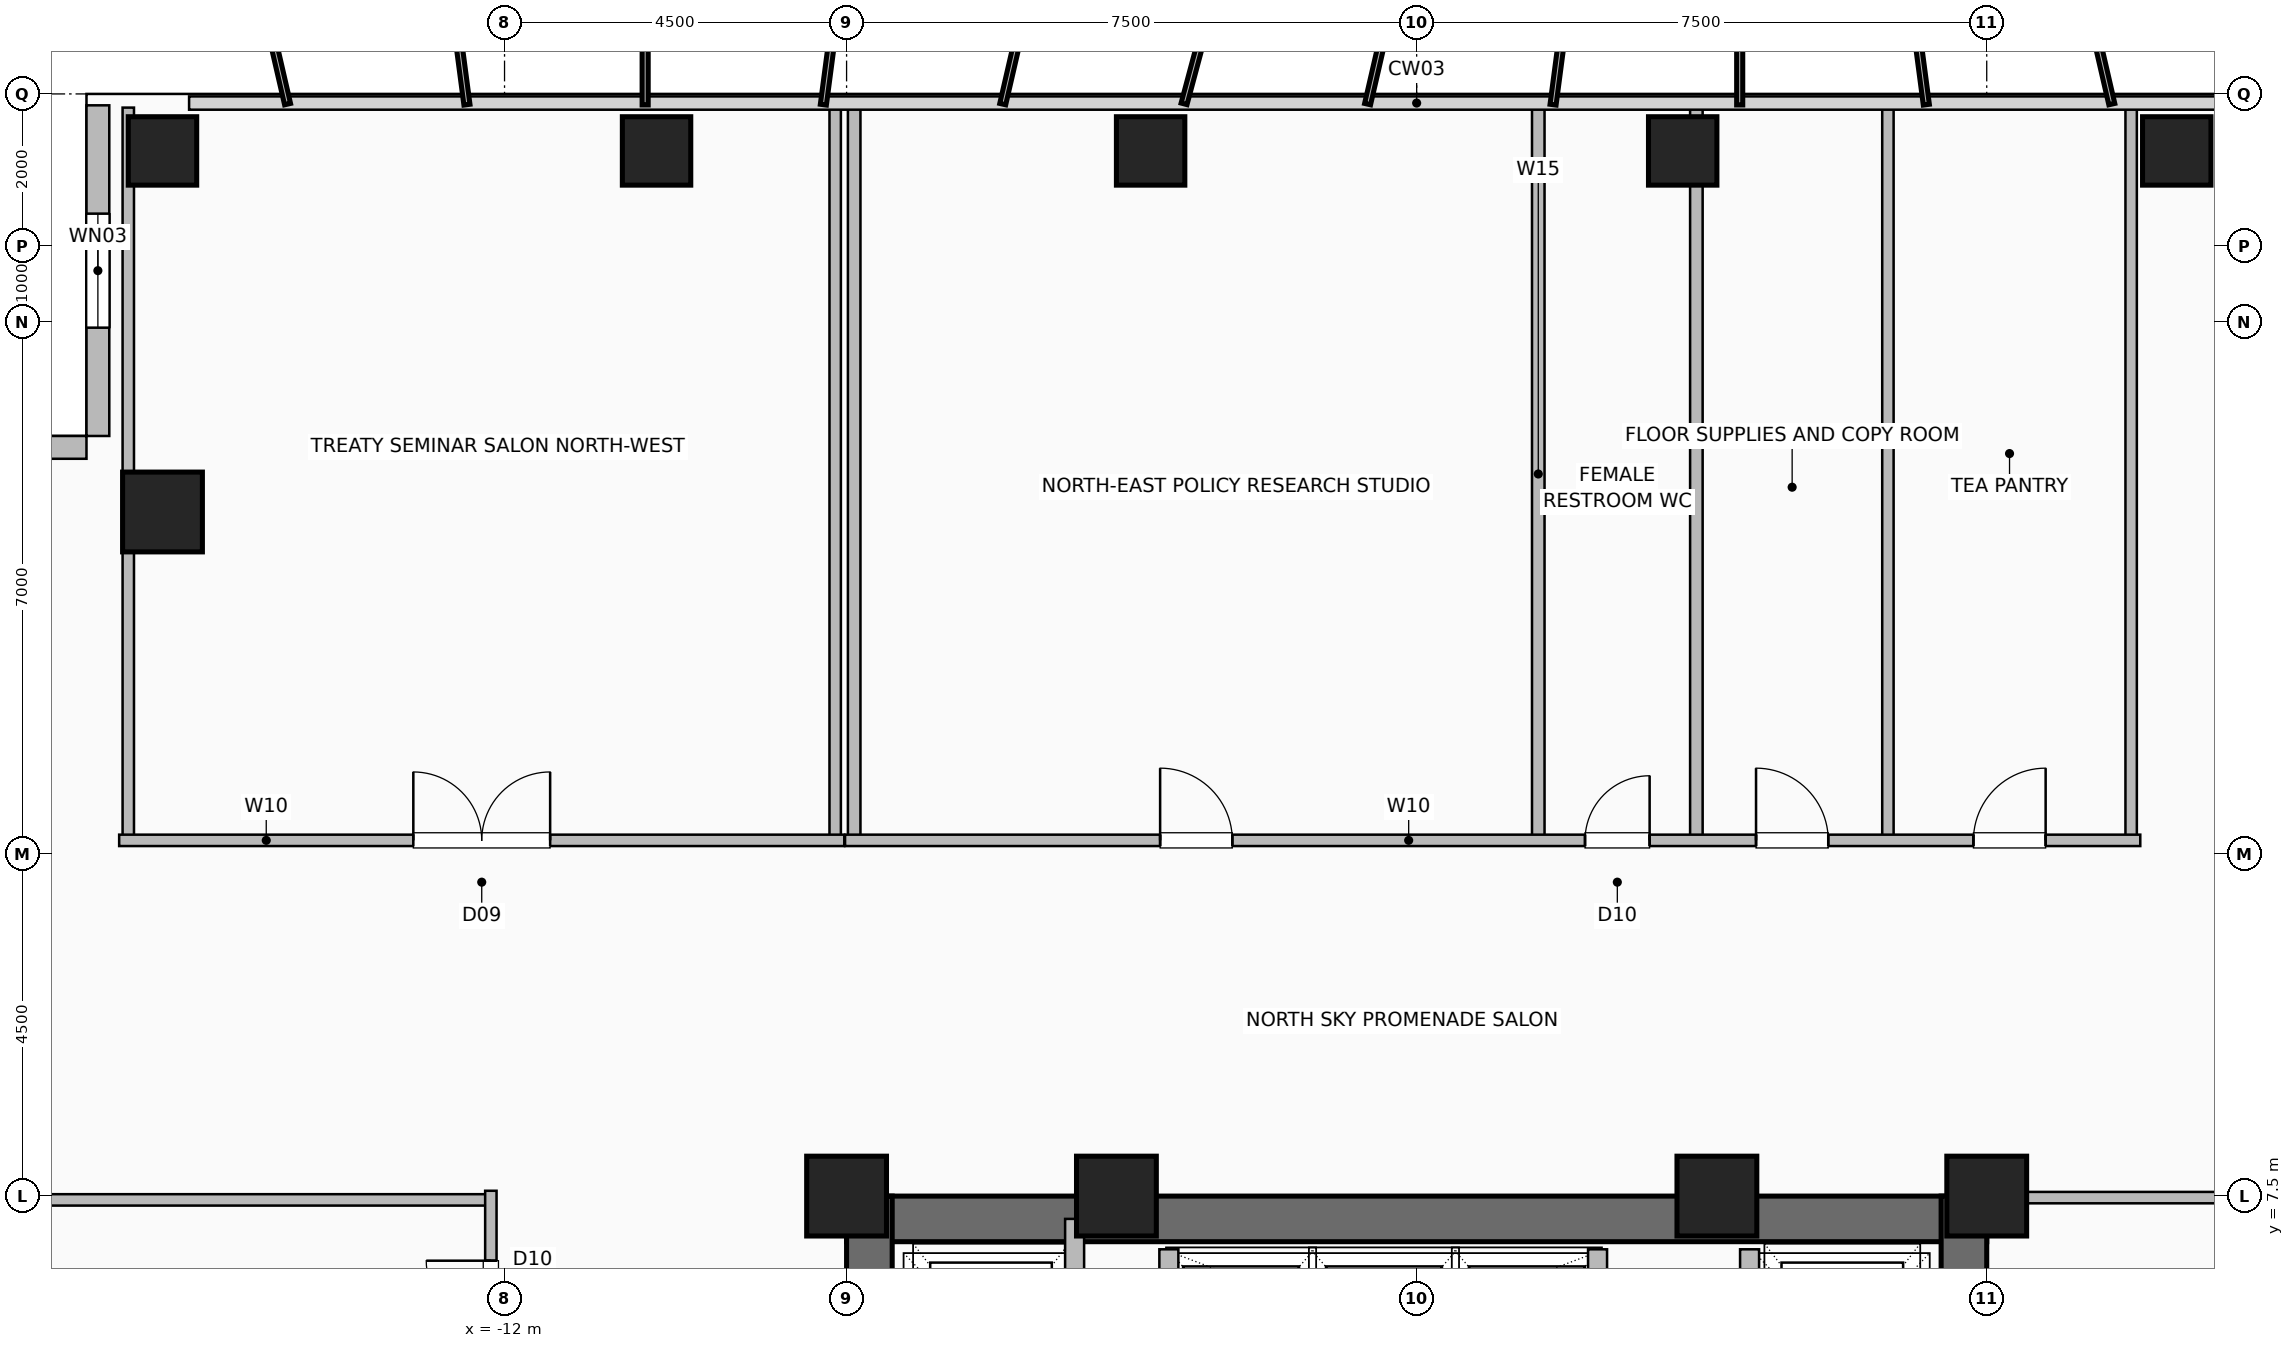
"""IFC4 building model, lengths in metres.
Left out: names, types, materials, properties, quantities, classifications, styles, units other than length and angle.
Written with IfcOpenShell. Run it as: python <this file> out.ifc"""

import sys

from ifc_helpers import new_model, si_unit, direction, frame, frame_2d, origin, origin_2d, place, context, subcontext, project, spatial, rectangle, hollow_rectangle, extrude, element, fill, save


model = new_model("IFC4")
c1 = context("Model", 3, precision=1e-05, world=origin(), true_north=direction((0.0, 1.0)))
c2 = subcontext(c1, "Body", "Model", "MODEL_VIEW")
j1 = project(units=[si_unit("LENGTHUNIT", "METRE"), si_unit("PLANEANGLEUNIT", "RADIAN")], contexts=[c1])
p1 = place(None, origin())
s1 = spatial("IfcSite", under=j1, at=p1, CompositionType="ELEMENT")
p2 = place(p1, origin())
s2 = spatial("IfcBuilding", under=s1, at=p2, CompositionType="ELEMENT")
p3 = place(p2, frame((0.0, 0.0, 104.8)))
s3 = spatial("IfcBuildingStorey", under=s2, at=p3, CompositionType="ELEMENT", Elevation=104.8)
for number, where, z_axis, x_axis in (
    (1, (7.5, 7.5, 0.0), (0.0, 0.0, 1.0), (1.0, 0.0, 0.0)),
    (2, (3.95, 7.5, 0.0), (0.0, 0.0, 1.0), (1.0, 0.0, 0.0)),
    (3, (-3.95, 7.5, 0.0), (0.0, 0.0, 1.0), (1.0, 0.0, 0.0)),
    (4, (-7.5, 7.5, 0.0), (0.0, 0.0, 1.0), (1.0, 0.0, 0.0)),
):
    element("IfcColumn", number, at=place(p3, frame(where, z_axis=z_axis, x_axis=x_axis)), inside=s3, PredefinedType="COLUMN", context=c2, shape_type="SweptSolid", body=[
        extrude(hollow_rectangle(XDim=1.05, YDim=1.05, WallThickness=0.05, at=origin_2d()), origin(), (0.0, 0.0, 1.0), 3.6),
    ])
for number, where, z_axis, x_axis in (
    (5, (-16.5, 21.25, 0.0), (0.0, 0.0, 1.0), (1.0, 0.0, 0.0)),
    (6, (-10.0, 21.25, 0.0), (0.0, 0.0, 1.0), (1.0, 0.0, 0.0)),
    (7, (-3.5, 21.25, 0.0), (0.0, 0.0, 1.0), (1.0, 0.0, 0.0)),
    (8, (3.5, 21.25, 0.0), (0.0, 0.0, 1.0), (1.0, 0.0, 0.0)),
    (9, (10.0, 21.25, 0.0), (0.0, 0.0, 1.0), (1.0, 0.0, 0.0)),
):
    element("IfcColumn", number, at=place(p3, frame(where, z_axis=z_axis, x_axis=x_axis)), inside=s3, PredefinedType="COLUMN", context=c2, shape_type="SweptSolid", body=[
        extrude(hollow_rectangle(XDim=0.9, YDim=0.9, WallThickness=0.045, at=origin_2d()), origin(), (0.0, 0.0, 1.0), 3.6),
    ])
p4 = place(p3, frame((-16.5, 16.5, 0.0), z_axis=(0.0, 0.0, 1.0), x_axis=(1.0, 0.0, 0.0)))
e10 = element("IfcColumn", 10, at=p4, inside=s3, PredefinedType="COLUMN", context=c2, shape_type="SweptSolid", body=[
    extrude(hollow_rectangle(XDim=1.05, YDim=1.05, WallThickness=0.05, at=origin_2d()), origin(), (0.0, 0.0, 1.0), 3.6),
])
p5 = place(p3, frame((-17.35, 21.85, 0.0), z_axis=(0.0, 0.0, 1.0), x_axis=(0.0, -1.0, 0.0)))
e11 = element("IfcWall", 11, at=p5, inside=s3, PredefinedType="SOLIDWALL", context=c2, shape_type="SweptSolid", body=[
    extrude(rectangle(XDim=4.35, YDim=0.3, at=frame_2d((2.175, 0.0))), origin(), (0.0, 0.0, 1.0), 3.36),
])
p6 = place(p5, frame((1.425, 0.0, 0.9)))
e12 = element("IfcOpeningElement", 12, at=p6, cuts=e11, PredefinedType="OPENING", context=c2, shape_type="SweptSolid", body=[
    extrude(rectangle(XDim=1.5, YDim=1.8, at=frame_2d((0.75, 0.9))), frame((0.0, 0.16, 0.0), z_axis=(0.0, -1.0, 0.0), x_axis=(1.0, 0.0, 0.0)), (0.0, 0.0, 1.0), 0.32),
])
p7 = place(p3, frame((-21.85, 17.35, 0.0), z_axis=(0.0, 0.0, 1.0), x_axis=(1.0, 0.0, 0.0)))
e13 = element("IfcWall", 13, at=p7, inside=s3, PredefinedType="SOLIDWALL", context=c2, shape_type="SweptSolid", body=[
    extrude(rectangle(XDim=4.35, YDim=0.3, at=frame_2d((2.175, 0.0))), origin(), (0.0, 0.0, 1.0), 3.36),
])
p8 = place(p3, frame((-7.5, 7.2, 0.0), z_axis=(0.0, 0.0, 1.0), x_axis=(1.0, 0.0, 0.0)))
e14 = element("IfcWall", 14, at=p8, inside=s3, PredefinedType="SHEAR", context=c2, shape_type="SweptSolid", body=[
    extrude(rectangle(XDim=15.0, YDim=0.6, at=frame_2d((7.5, 0.0))), origin(), (0.0, 0.0, 1.0), 3.36),
])
p9 = place(p3, frame((-7.2, -7.5, 0.0), z_axis=(0.0, 0.0, 1.0), x_axis=(0.0, 1.0, 0.0)))
e15 = element("IfcWall", 15, at=p9, inside=s3, PredefinedType="SHEAR", context=c2, shape_type="SweptSolid", body=[
    extrude(rectangle(XDim=15.0, YDim=0.6, at=frame_2d((7.5, 0.0))), origin(), (0.0, 0.0, 1.0), 3.36),
])
p10 = place(p9, frame((9.5, 0.0, 0.0)))
e16 = element("IfcOpeningElement", 16, at=p10, cuts=e15, PredefinedType="OPENING", context=c2, shape_type="SweptSolid", body=[
    extrude(rectangle(XDim=1.0, YDim=2.08, at=frame_2d((0.5, 1.04))), frame((0.0, 0.31, 0.0), z_axis=(0.0, -1.0, 0.0), x_axis=(1.0, 0.0, 0.0)), (0.0, 0.0, 1.0), 0.62),
])
p11 = place(p3, frame((7.2, -7.5, 0.0), z_axis=(0.0, 0.0, 1.0), x_axis=(0.0, 1.0, 0.0)))
e17 = element("IfcWall", 17, at=p11, inside=s3, PredefinedType="SHEAR", context=c2, shape_type="SweptSolid", body=[
    extrude(rectangle(XDim=15.0, YDim=0.6, at=frame_2d((7.5, 0.0))), origin(), (0.0, 0.0, 1.0), 3.36),
])
for number, where, z_axis, x_axis in (
    (18, (-3.26, 4.58, 0.0), (0.0, 0.0, 1.0), (0.0, 1.0, 0.0)),
    (19, (2.38, 4.58, 0.0), (0.0, 0.0, 1.0), (0.0, 1.0, 0.0)),
):
    element("IfcWall", number, at=place(p3, frame(where, z_axis=z_axis, x_axis=x_axis)), inside=s3, PredefinedType="SHEAR", context=c2, shape_type="SweptSolid", body=[
        extrude(rectangle(XDim=2.22, YDim=0.25, at=frame_2d((1.11, 0.0))), origin(), (0.0, 0.0, 1.0), 3.36),
    ])
p12 = place(p3, frame((-4.5, 4.35, 0.0), z_axis=(0.0, 0.0, 1.0), x_axis=(0.0, 1.0, 0.0)))
e20 = element("IfcWall", 20, at=p12, inside=s3, PredefinedType="SHEAR", context=c2, shape_type="SweptSolid", body=[
    extrude(rectangle(XDim=2.85, YDim=0.25, at=frame_2d((1.425, 0.0))), origin(), (0.0, 0.0, 1.0), 3.36),
])
p13 = place(p3, frame((4.38, 4.3, 0.0), z_axis=(0.0, 0.0, 1.0), x_axis=(0.0, 1.0, 0.0)))
e21 = element("IfcWall", 21, at=p13, inside=s3, PredefinedType="SHEAR", context=c2, shape_type="SweptSolid", body=[
    extrude(rectangle(XDim=2.5, YDim=0.25, at=frame_2d((1.25, 0.0))), origin(), (0.0, 0.0, 1.0), 3.36),
])
p14 = place(p13, frame((0.8, 0.0, 0.0)))
e22 = element("IfcOpeningElement", 22, at=p14, cuts=e21, PredefinedType="OPENING", context=c2, shape_type="SweptSolid", body=[
    extrude(rectangle(XDim=1.2, YDim=2.2, at=frame_2d((0.6, 1.1))), frame((0.0, 0.135, 0.0), z_axis=(0.0, -1.0, 0.0), x_axis=(1.0, 0.0, 0.0)), (0.0, 0.0, 1.0), 0.27),
])
p15 = place(p3, frame((-21.82, 7.45, 0.0), z_axis=(0.0, 0.0, 1.0), x_axis=(1.0, 0.0, 0.0)))
e23 = element("IfcWall", 23, at=p15, inside=s3, PredefinedType="PARTITIONING", context=c2, shape_type="SweptSolid", body=[
    extrude(rectangle(XDim=9.64, YDim=0.15, at=frame_2d((4.82, 0.0))), origin(), (0.0, 0.0, 1.0), 3.36),
])
p16 = place(p3, frame((-12.18, -7.57, 0.0), z_axis=(0.0, 0.0, 1.0), x_axis=(0.0, 1.0, 0.0)))
e24 = element("IfcWall", 24, at=p16, inside=s3, PredefinedType="PARTITIONING", context=c2, shape_type="SweptSolid", body=[
    extrude(rectangle(XDim=15.14, YDim=0.15, at=frame_2d((7.57, 0.0))), origin(), (0.0, 0.0, 1.0), 3.36),
])
p17 = place(p16, frame((2.62, 0.0, 0.0)))
e25 = element("IfcOpeningElement", 25, at=p17, cuts=e24, PredefinedType="OPENING", context=c2, shape_type="SweptSolid", body=[
    extrude(rectangle(XDim=0.95, YDim=2.06, at=frame_2d((0.475, 1.03))), frame((0.0, 0.085, 0.0), z_axis=(0.0, -1.0, 0.0), x_axis=(1.0, 0.0, 0.0)), (0.0, 0.0, 1.0), 0.17),
])
p18 = place(p16, frame((8.845, 0.0, 0.0)))
e26 = element("IfcOpeningElement", 26, at=p18, cuts=e24, PredefinedType="OPENING", context=c2, shape_type="SweptSolid", body=[
    extrude(rectangle(XDim=0.95, YDim=2.06, at=frame_2d((0.475, 1.03))), frame((0.0, 0.085, 0.0), z_axis=(0.0, -1.0, 0.0), x_axis=(1.0, 0.0, 0.0)), (0.0, 0.0, 1.0), 0.17),
])
p19 = place(p16, frame((13.37, 0.0, 0.0)))
e27 = element("IfcOpeningElement", 27, at=p19, cuts=e24, PredefinedType="OPENING", context=c2, shape_type="SweptSolid", body=[
    extrude(rectangle(XDim=0.85, YDim=2.05, at=frame_2d((0.425, 1.025))), frame((0.0, 0.085, 0.0), z_axis=(0.0, -1.0, 0.0), x_axis=(1.0, 0.0, 0.0)), (0.0, 0.0, 1.0), 0.17),
])
for number, where, z_axis, x_axis in (
    (28, (-16.95, 12.18, 0.0), (0.0, 0.0, 1.0), (0.0, 1.0, 0.0)),
    (29, (-7.65, 12.18, 0.0), (0.0, 0.0, 1.0), (0.0, 1.0, 0.0)),
):
    element("IfcWall", number, at=place(p3, frame(where, z_axis=z_axis, x_axis=x_axis)), inside=s3, PredefinedType="PARTITIONING", context=c2, shape_type="SweptSolid", body=[
        extrude(rectangle(XDim=9.64, YDim=0.15, at=frame_2d((4.82, 0.0))), origin(), (0.0, 0.0, 1.0), 3.36),
    ])
p20 = place(p3, frame((-17.07, 12.18, 0.0), z_axis=(0.0, 0.0, 1.0), x_axis=(1.0, 0.0, 0.0)))
e30 = element("IfcWall", 30, at=p20, inside=s3, PredefinedType="PARTITIONING", context=c2, shape_type="SweptSolid", body=[
    extrude(rectangle(XDim=9.54, YDim=0.15, at=frame_2d((4.77, 0.0))), origin(), (0.0, 0.0, 1.0), 3.36),
])
p21 = place(p20, frame((3.87, 0.0, 0.0)))
e31 = element("IfcOpeningElement", 31, at=p21, cuts=e30, PredefinedType="OPENING", context=c2, shape_type="SweptSolid", body=[
    extrude(rectangle(XDim=1.8, YDim=2.08, at=frame_2d((0.9, 1.04))), frame((0.0, 0.085, 0.0), z_axis=(0.0, -1.0, 0.0), x_axis=(1.0, 0.0, 0.0)), (0.0, 0.0, 1.0), 0.17),
])
for number, where, z_axis, x_axis in (
    (32, (3.68, 12.18, 0.0), (0.0, 0.0, 1.0), (0.0, 1.0, 0.0)),
    (33, (-7.4, 12.18, 0.0), (0.0, 0.0, 1.0), (0.0, 1.0, 0.0)),
    (34, (1.6, 12.18, 0.0), (0.0, 0.0, 1.0), (0.0, 1.0, 0.0)),
):
    element("IfcWall", number, at=place(p3, frame(where, z_axis=z_axis, x_axis=x_axis)), inside=s3, PredefinedType="PLUMBINGWALL", context=c2, shape_type="SweptSolid", body=[
        extrude(rectangle(XDim=9.64, YDim=0.165, at=frame_2d((4.82, 0.0))), origin(), (0.0, 0.0, 1.0), 3.36),
    ])
for number, where, z_axis, x_axis in (
    (35, (6.2, 12.18, 0.0), (0.0, 0.0, 1.0), (0.0, 1.0, 0.0)),
    (36, (9.4, 12.18, 0.0), (0.0, 0.0, 1.0), (0.0, 1.0, 0.0)),
):
    element("IfcWall", number, at=place(p3, frame(where, z_axis=z_axis, x_axis=x_axis)), inside=s3, PredefinedType="PARTITIONING", context=c2, shape_type="SweptSolid", body=[
        extrude(rectangle(XDim=9.64, YDim=0.15, at=frame_2d((4.82, 0.0))), origin(), (0.0, 0.0, 1.0), 3.36),
    ])
p22 = place(p3, frame((-7.52, 12.18, 0.0), z_axis=(0.0, 0.0, 1.0), x_axis=(1.0, 0.0, 0.0)))
e37 = element("IfcWall", 37, at=p22, inside=s3, PredefinedType="PARTITIONING", context=c2, shape_type="SweptSolid", body=[
    extrude(rectangle(XDim=17.04, YDim=0.15, at=frame_2d((8.52, 0.0))), origin(), (0.0, 0.0, 1.0), 3.36),
])
p23 = place(p22, frame((4.145, 0.0, 0.0)))
e38 = element("IfcOpeningElement", 38, at=p23, cuts=e37, PredefinedType="OPENING", context=c2, shape_type="SweptSolid", body=[
    extrude(rectangle(XDim=0.95, YDim=2.06, at=frame_2d((0.475, 1.03))), frame((0.0, 0.085, 0.0), z_axis=(0.0, -1.0, 0.0), x_axis=(1.0, 0.0, 0.0)), (0.0, 0.0, 1.0), 0.17),
])
p24 = place(p22, frame((9.735, 0.0, 0.0)))
e39 = element("IfcOpeningElement", 39, at=p24, cuts=e37, PredefinedType="OPENING", context=c2, shape_type="SweptSolid", body=[
    extrude(rectangle(XDim=0.85, YDim=2.05, at=frame_2d((0.425, 1.025))), frame((0.0, 0.085, 0.0), z_axis=(0.0, -1.0, 0.0), x_axis=(1.0, 0.0, 0.0)), (0.0, 0.0, 1.0), 0.17),
])
p25 = place(p22, frame((11.985, 0.0, 0.0)))
e40 = element("IfcOpeningElement", 40, at=p25, cuts=e37, PredefinedType="OPENING", context=c2, shape_type="SweptSolid", body=[
    extrude(rectangle(XDim=0.95, YDim=2.06, at=frame_2d((0.475, 1.03))), frame((0.0, 0.085, 0.0), z_axis=(0.0, -1.0, 0.0), x_axis=(1.0, 0.0, 0.0)), (0.0, 0.0, 1.0), 0.17),
])
p26 = place(p22, frame((14.845, 0.0, 0.0)))
e41 = element("IfcOpeningElement", 41, at=p26, cuts=e37, PredefinedType="OPENING", context=c2, shape_type="SweptSolid", body=[
    extrude(rectangle(XDim=0.95, YDim=2.06, at=frame_2d((0.475, 1.03))), frame((0.0, 0.085, 0.0), z_axis=(0.0, -1.0, 0.0), x_axis=(1.0, 0.0, 0.0)), (0.0, 0.0, 1.0), 0.17),
])
p27 = place(p3, frame((7.6, 7.48, 0.0), z_axis=(0.0, 0.0, 1.0), x_axis=(1.0, 0.0, 0.0)))
e42 = element("IfcWall", 42, at=p27, inside=s3, PredefinedType="PARTITIONING", context=c2, shape_type="SweptSolid", body=[
    extrude(rectangle(XDim=14.22, YDim=0.15, at=frame_2d((7.11, 0.0))), origin(), (0.0, 0.0, 1.0), 3.36),
])
p28 = place(p6, origin())
e43 = element("IfcWindow", 43, at=p28, inside=s3, PartitioningType="SINGLE_PANEL", PredefinedType="WINDOW", context=c2, shape_type="SweptSolid", body=[
    extrude(rectangle(XDim=1.5, YDim=1.8, at=frame_2d((0.75, 0.9))), frame((0.0, 0.03, 0.0), z_axis=(0.0, -1.0, 0.0), x_axis=(1.0, 0.0, 0.0)), (0.0, 0.0, 1.0), 0.06),
])
fill(e12, e43)
p29 = place(p19, origin())
e44 = element("IfcDoor", 44, at=p29, inside=s3, OperationType="SINGLE_SWING_RIGHT", PredefinedType="DOOR", context=c2, shape_type="SweptSolid", body=[
    extrude(rectangle(XDim=0.85, YDim=2.05, at=frame_2d((0.425, 1.025))), frame((0.0, 0.025, 0.0), z_axis=(0.0, -1.0, 0.0), x_axis=(1.0, 0.0, 0.0)), (0.0, 0.0, 1.0), 0.05),
])
fill(e27, e44)
p30 = place(p21, origin())
e45 = element("IfcDoor", 45, at=p30, inside=s3, OperationType="DOUBLE_DOOR_SINGLE_SWING", PredefinedType="DOOR", context=c2, shape_type="SweptSolid", body=[
    extrude(rectangle(XDim=1.8, YDim=2.08, at=frame_2d((0.9, 1.04))), frame((0.0, 0.025, 0.0), z_axis=(0.0, -1.0, 0.0), x_axis=(1.0, 0.0, 0.0)), (0.0, 0.0, 1.0), 0.05),
])
fill(e31, e45)
p31 = place(p23, origin())
e46 = element("IfcDoor", 46, at=p31, inside=s3, OperationType="SINGLE_SWING_LEFT", PredefinedType="DOOR", context=c2, shape_type="SweptSolid", body=[
    extrude(rectangle(XDim=0.95, YDim=2.06, at=frame_2d((0.475, 1.03))), frame((0.0, 0.025, 0.0), z_axis=(0.0, -1.0, 0.0), x_axis=(1.0, 0.0, 0.0)), (0.0, 0.0, 1.0), 0.05),
])
fill(e38, e46)
p32 = place(p24, origin())
e47 = element("IfcDoor", 47, at=p32, inside=s3, OperationType="SINGLE_SWING_RIGHT", PredefinedType="DOOR", context=c2, shape_type="SweptSolid", body=[
    extrude(rectangle(XDim=0.85, YDim=2.05, at=frame_2d((0.425, 1.025))), frame((0.0, 0.025, 0.0), z_axis=(0.0, -1.0, 0.0), x_axis=(1.0, 0.0, 0.0)), (0.0, 0.0, 1.0), 0.05),
])
fill(e39, e47)
p33 = place(p25, origin())
e48 = element("IfcDoor", 48, at=p33, inside=s3, OperationType="SINGLE_SWING_LEFT", PredefinedType="DOOR", context=c2, shape_type="SweptSolid", body=[
    extrude(rectangle(XDim=0.95, YDim=2.06, at=frame_2d((0.475, 1.03))), frame((0.0, 0.025, 0.0), z_axis=(0.0, -1.0, 0.0), x_axis=(1.0, 0.0, 0.0)), (0.0, 0.0, 1.0), 0.05),
])
fill(e40, e48)
p34 = place(p26, origin())
e49 = element("IfcDoor", 49, at=p34, inside=s3, OperationType="SINGLE_SWING_RIGHT", PredefinedType="DOOR", context=c2, shape_type="SweptSolid", body=[
    extrude(rectangle(XDim=0.95, YDim=2.06, at=frame_2d((0.475, 1.03))), frame((0.0, 0.025, 0.0), z_axis=(0.0, -1.0, 0.0), x_axis=(1.0, 0.0, 0.0)), (0.0, 0.0, 1.0), 0.05),
])
fill(e41, e49)
save(model, sys.argv[1])
